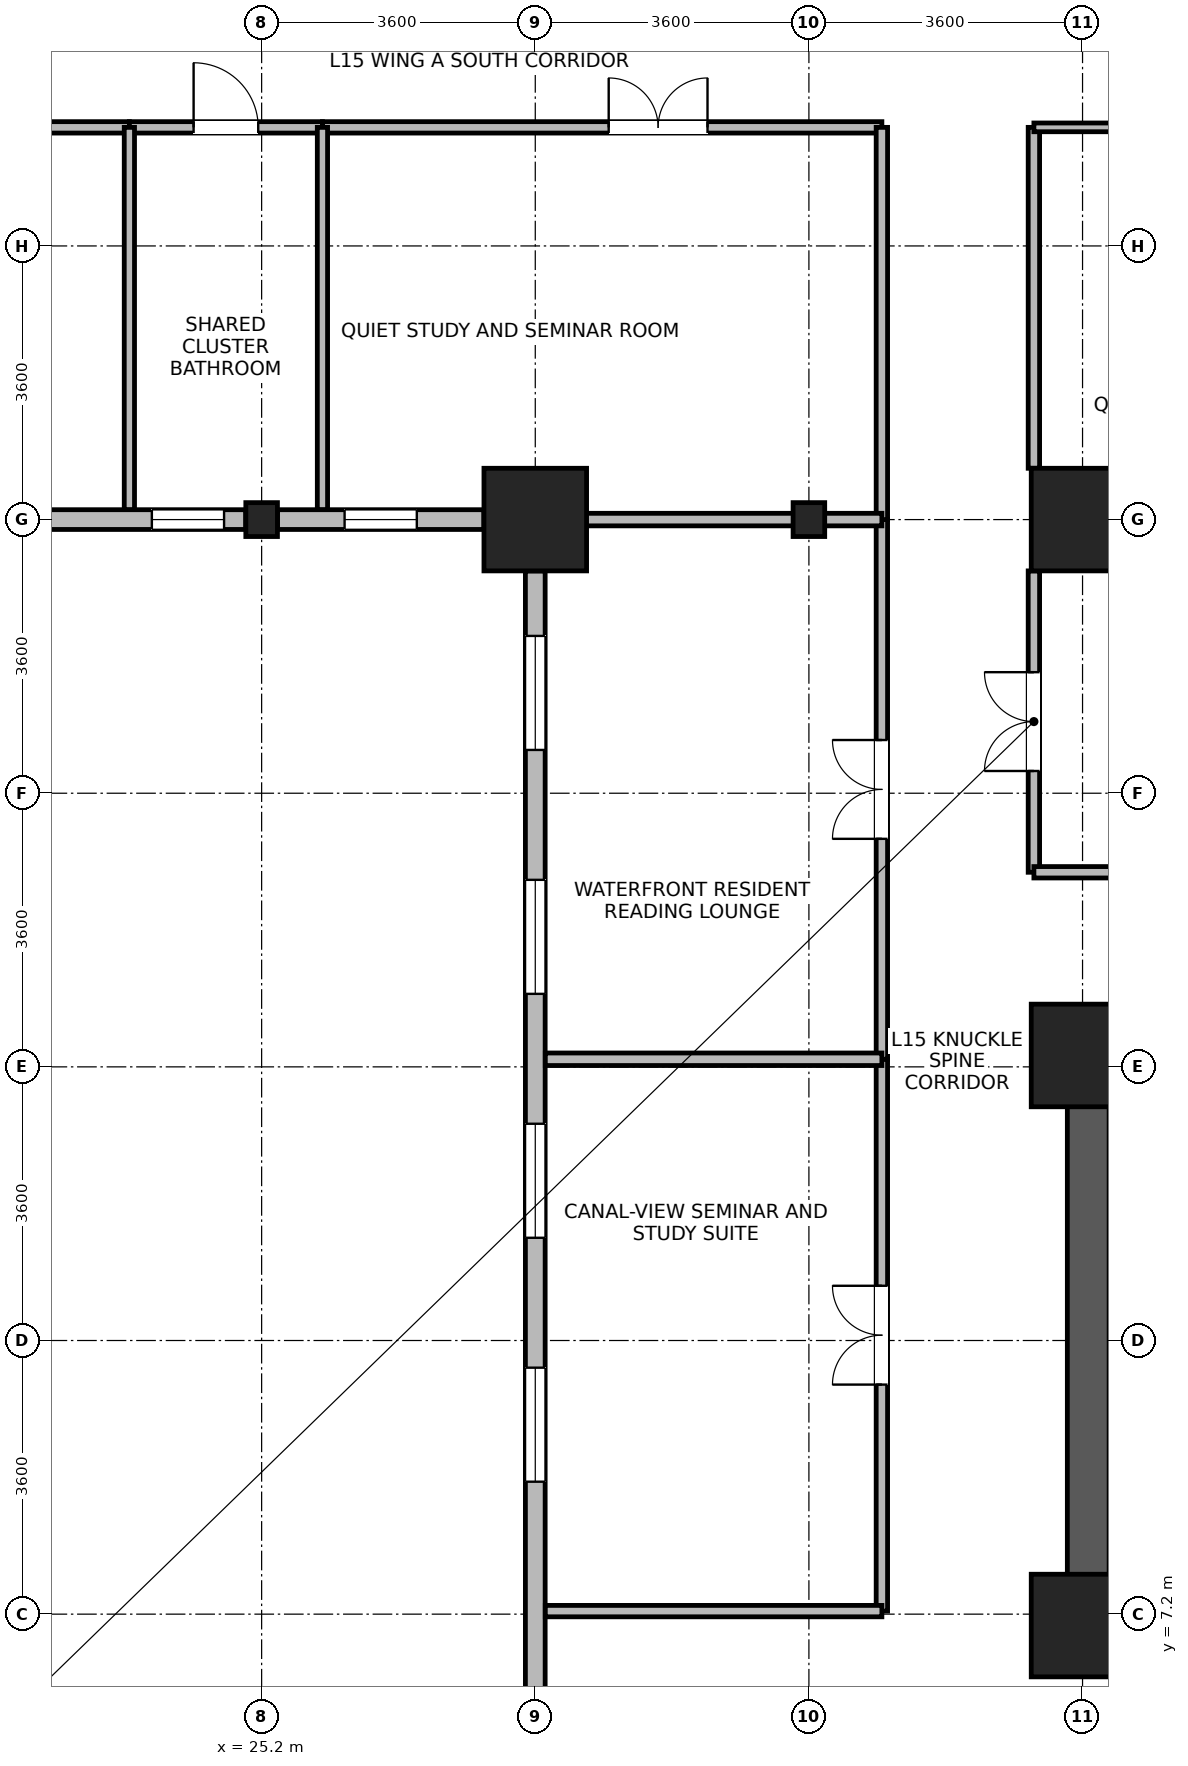
"""IFC4 building model, lengths in metres.
Left out: names, types, materials, properties, quantities, classifications, styles, units other than length and angle.
Written with IfcOpenShell. Run it as: python <this file> out.ifc"""

import sys

from ifc_helpers import new_model, si_unit, direction, frame, frame_2d, origin, origin_2d, place, context, subcontext, project, spatial, rectangle, i_section, extrude, source, transform, mapped, element, fill, save


model = new_model("IFC4")
c1 = context("Model", 3, precision=1e-05, world=origin(), true_north=direction((0.0, 1.0)))
c2 = subcontext(c1, "Body", "Model", "MODEL_VIEW")
j1 = project(units=[si_unit("LENGTHUNIT", "METRE"), si_unit("PLANEANGLEUNIT", "RADIAN")], contexts=[c1])
p1 = place(None, origin())
s1 = spatial("IfcSite", under=j1, at=p1, CompositionType="ELEMENT")
p2 = place(p1, origin())
s2 = spatial("IfcBuilding", under=s1, at=p2, CompositionType="ELEMENT")
p3 = place(p2, frame((0.0, 0.0, 62.3)))
s3 = spatial("IfcBuildingStorey", under=s2, at=p3, CompositionType="ELEMENT", Elevation=62.3)
p4 = place(p3, frame((36.075, 6.75, 0.0), z_axis=(0.0, 0.0, 1.0), x_axis=(0.0, 1.0, 0.0)))
e1 = element("IfcWall", 1, at=p4, inside=s3, PredefinedType="SHEAR", context=c2, shape_type="SweptSolid", body=[
    extrude(rectangle(XDim=8.1, YDim=0.55, at=frame_2d((4.05, 0.0))), origin(), (0.0, 0.0, 1.0), 3.45),
])
m1 = source(origin(), c2, "Body", "SweptSolid", [
    extrude(rectangle(XDim=1.35, YDim=1.35, at=origin_2d()), origin(), (0.0, 0.0, 1.0), 3.7),
])
for number, where, z_axis, x_axis in (
    (2, (28.8, 21.6, 0.0), (0.0, 0.0, 1.0), (1.0, 0.0, 0.0)),
    (3, (36.0, 21.6, 0.0), (0.0, 0.0, 1.0), (1.0, 0.0, 0.0)),
    (4, (36.0, 7.05, 0.0), (0.0, 0.0, 1.0), (1.0, 0.0, 0.0)),
    (5, (36.0, 14.55, 0.0), (0.0, 0.0, 1.0), (1.0, 0.0, 0.0)),
):
    element("IfcColumn", number, at=place(p3, frame(where, z_axis=z_axis, x_axis=x_axis)), inside=s3, PredefinedType="COLUMN", context=c2, shape_type="MappedRepresentation", body=[
        mapped(m1, transform((0.0, 0.0, 0.0), x_axis=(1.0, 0.0, 0.0), y_axis=(0.0, 1.0, 0.0), z_axis=(0.0, 0.0, 1.0), scale=1.0)),
    ])
m2 = source(origin(), c2, "Body", "SweptSolid", [
    extrude(i_section(OverallWidth=0.416, OverallDepth=0.446, WebThickness=0.029, FlangeThickness=0.04, FilletRadius=0.015, at=origin_2d()), origin(), (0.0, 0.0, 1.0), 3.7),
])
for number, where, z_axis, x_axis in (
    (6, (25.2, 21.6, 0.0), (0.0, 0.0, 1.0), (1.0, 0.0, 0.0)),
    (7, (32.4, 21.6, 0.0), (0.0, 0.0, 1.0), (1.0, 0.0, 0.0)),
):
    element("IfcColumn", number, at=place(p3, frame(where, z_axis=z_axis, x_axis=x_axis)), inside=s3, PredefinedType="COLUMN", context=c2, shape_type="MappedRepresentation", body=[
        mapped(m2, transform((0.0, 0.0, 0.0), x_axis=(1.0, 0.0, 0.0), y_axis=(0.0, 1.0, 0.0), z_axis=(0.0, 0.0, 1.0), scale=1.0)),
    ])
p5 = place(p3, frame((24.991, 21.6, 0.0), z_axis=(0.0, 0.0, 1.0), x_axis=(-1.0, 0.0, 0.0)))
e8 = element("IfcWall", 8, at=p5, inside=s3, PredefinedType="STANDARD", context=c2, shape_type="SweptSolid", body=[
    extrude(rectangle(XDim=2.715, YDim=0.26, at=frame_2d((1.357, 0.0))), origin(), (0.0, 0.0, 1.0), 2.93),
])
p6 = place(p5, frame((0.285, 0.0, 0.85)))
e9 = element("IfcOpeningElement", 9, at=p6, cuts=e8, PredefinedType="OPENING", context=c2, shape_type="SweptSolid", body=[
    extrude(rectangle(XDim=0.95, YDim=1.75, at=frame_2d((0.475, 0.875))), frame((0.0, 0.14, 0.0), z_axis=(0.0, -1.0, 0.0), x_axis=(1.0, 0.0, 0.0)), (0.0, 0.0, 1.0), 0.28),
])
p7 = place(p3, frame((28.124, 21.6, 0.0), z_axis=(0.0, 0.0, 1.0), x_axis=(-1.0, 0.0, 0.0)))
e10 = element("IfcWall", 10, at=p7, inside=s3, PredefinedType="STANDARD", context=c2, shape_type="SweptSolid", body=[
    extrude(rectangle(XDim=2.715, YDim=0.26, at=frame_2d((1.357, 0.0))), origin(), (0.0, 0.0, 1.0), 2.93),
])
p8 = place(p7, frame((0.883, 0.0, 0.85)))
e11 = element("IfcOpeningElement", 11, at=p8, cuts=e10, PredefinedType="OPENING", context=c2, shape_type="SweptSolid", body=[
    extrude(rectangle(XDim=0.95, YDim=1.75, at=frame_2d((0.475, 0.875))), frame((0.0, 0.14, 0.0), z_axis=(0.0, -1.0, 0.0), x_axis=(1.0, 0.0, 0.0)), (0.0, 0.0, 1.0), 0.28),
])
p9 = place(p3, frame((28.8, 1.67, 0.0), z_axis=(0.0, 0.0, 1.0), x_axis=(0.0, 1.0, 0.0)))
e12 = element("IfcWall", 12, at=p9, inside=s3, PredefinedType="STANDARD", context=c2, shape_type="SweptSolid", body=[
    extrude(rectangle(XDim=19.254, YDim=0.26, at=frame_2d((9.627, 0.0))), origin(), (0.0, 0.0, 1.0), 3.43),
])
p10 = place(p9, frame((0.854, 0.0, 0.85)))
e13 = element("IfcOpeningElement", 13, at=p10, cuts=e12, PredefinedType="OPENING", context=c2, shape_type="SweptSolid", body=[
    extrude(rectangle(XDim=1.5, YDim=1.85, at=frame_2d((0.75, 0.925))), frame((0.0, 0.14, 0.0), z_axis=(0.0, -1.0, 0.0), x_axis=(1.0, 0.0, 0.0)), (0.0, 0.0, 1.0), 0.28),
])
p11 = place(p9, frame((7.272, 0.0, 0.85)))
e14 = element("IfcOpeningElement", 14, at=p11, cuts=e12, PredefinedType="OPENING", context=c2, shape_type="SweptSolid", body=[
    extrude(rectangle(XDim=1.5, YDim=1.85, at=frame_2d((0.75, 0.925))), frame((0.0, 0.14, 0.0), z_axis=(0.0, -1.0, 0.0), x_axis=(1.0, 0.0, 0.0)), (0.0, 0.0, 1.0), 0.28),
])
p12 = place(p9, frame((10.481, 0.0, 0.85)))
e15 = element("IfcOpeningElement", 15, at=p12, cuts=e12, PredefinedType="OPENING", context=c2, shape_type="SweptSolid", body=[
    extrude(rectangle(XDim=1.5, YDim=1.85, at=frame_2d((0.75, 0.925))), frame((0.0, 0.14, 0.0), z_axis=(0.0, -1.0, 0.0), x_axis=(1.0, 0.0, 0.0)), (0.0, 0.0, 1.0), 0.28),
])
p13 = place(p9, frame((13.69, 0.0, 0.85)))
e16 = element("IfcOpeningElement", 16, at=p13, cuts=e12, PredefinedType="OPENING", context=c2, shape_type="SweptSolid", body=[
    extrude(rectangle(XDim=1.5, YDim=1.85, at=frame_2d((0.75, 0.925))), frame((0.0, 0.14, 0.0), z_axis=(0.0, -1.0, 0.0), x_axis=(1.0, 0.0, 0.0)), (0.0, 0.0, 1.0), 0.28),
])
p14 = place(p9, frame((16.899, 0.0, 0.85)))
e17 = element("IfcOpeningElement", 17, at=p14, cuts=e12, PredefinedType="OPENING", context=c2, shape_type="SweptSolid", body=[
    extrude(rectangle(XDim=1.5, YDim=1.85, at=frame_2d((0.75, 0.925))), frame((0.0, 0.14, 0.0), z_axis=(0.0, -1.0, 0.0), x_axis=(1.0, 0.0, 0.0)), (0.0, 0.0, 1.0), 0.28),
])
p15 = place(p3, frame((35.36, 16.96, 0.0), z_axis=(0.0, 0.0, 1.0), x_axis=(0.0, 1.0, 0.0)))
e18 = element("IfcWall", 18, at=p15, inside=s3, PredefinedType="PARTITIONING", context=c2, shape_type="SweptSolid", body=[
    extrude(rectangle(XDim=3.965, YDim=0.15, at=frame_2d((1.982, 0.0))), origin(), (0.0, 0.0, 1.0), 3.43),
])
p16 = place(p15, frame((1.333, 0.0, 0.0)))
e19 = element("IfcOpeningElement", 19, at=p16, cuts=e18, PredefinedType="OPENING", context=c2, shape_type="SweptSolid", body=[
    extrude(rectangle(XDim=1.3, YDim=2.12, at=frame_2d((0.65, 1.06))), frame((0.0, 0.085, 0.0), z_axis=(0.0, -1.0, 0.0), x_axis=(1.0, 0.0, 0.0)), (0.0, 0.0, 1.0), 0.17),
])
p17 = place(p3, frame((35.36, 22.275, 0.0), z_axis=(0.0, 0.0, 1.0), x_axis=(0.0, 1.0, 0.0)))
e20 = element("IfcWall", 20, at=p17, inside=s3, PredefinedType="PARTITIONING", context=c2, shape_type="SweptSolid", body=[
    extrude(rectangle(XDim=4.485, YDim=0.15, at=frame_2d((2.243, 0.0))), origin(), (0.0, 0.0, 1.0), 3.43),
])
p18 = place(p3, frame((26.0, 26.76, 0.0), z_axis=(0.0, 0.0, 1.0), x_axis=(1.0, 0.0, 0.0)))
e21 = element("IfcWall", 21, at=p18, inside=s3, PredefinedType="PARTITIONING", context=c2, shape_type="SweptSolid", body=[
    extrude(rectangle(XDim=7.36, YDim=0.15, at=frame_2d((3.68, 0.0))), origin(), (0.0, 0.0, 1.0), 3.43),
])
p19 = place(p18, frame((3.766, 0.0, 0.0)))
e22 = element("IfcOpeningElement", 22, at=p19, cuts=e21, PredefinedType="OPENING", context=c2, shape_type="SweptSolid", body=[
    extrude(rectangle(XDim=1.3, YDim=2.12, at=frame_2d((0.65, 1.06))), frame((0.0, 0.085, 0.0), z_axis=(0.0, -1.0, 0.0), x_axis=(1.0, 0.0, 0.0)), (0.0, 0.0, 1.0), 0.17),
])
p20 = place(p3, frame((33.36, 7.24, 0.0), z_axis=(0.0, 0.0, 1.0), x_axis=(0.0, 1.0, 0.0)))
e23 = element("IfcWall", 23, at=p20, inside=s3, PredefinedType="PARTITIONING", context=c2, shape_type="SweptSolid", body=[
    extrude(rectangle(XDim=7.26, YDim=0.15, at=frame_2d((3.63, 0.0))), origin(), (0.0, 0.0, 1.0), 3.43),
])
p21 = place(p20, frame((2.98, 0.0, 0.0)))
e24 = element("IfcOpeningElement", 24, at=p21, cuts=e23, PredefinedType="OPENING", context=c2, shape_type="SweptSolid", body=[
    extrude(rectangle(XDim=1.3, YDim=2.12, at=frame_2d((0.65, 1.06))), frame((0.0, 0.085, 0.0), z_axis=(0.0, -1.0, 0.0), x_axis=(1.0, 0.0, 0.0)), (0.0, 0.0, 1.0), 0.17),
])
p22 = place(p3, frame((33.36, 14.5, 0.0), z_axis=(0.0, 0.0, 1.0), x_axis=(0.0, 1.0, 0.0)))
e25 = element("IfcWall", 25, at=p22, inside=s3, PredefinedType="PARTITIONING", context=c2, shape_type="SweptSolid", body=[
    extrude(rectangle(XDim=7.1, YDim=0.15, at=frame_2d((3.55, 0.0))), origin(), (0.0, 0.0, 1.0), 3.43),
])
p23 = place(p22, frame((2.9, 0.0, 0.0)))
e26 = element("IfcOpeningElement", 26, at=p23, cuts=e25, PredefinedType="OPENING", context=c2, shape_type="SweptSolid", body=[
    extrude(rectangle(XDim=1.3, YDim=2.12, at=frame_2d((0.65, 1.06))), frame((0.0, 0.085, 0.0), z_axis=(0.0, -1.0, 0.0), x_axis=(1.0, 0.0, 0.0)), (0.0, 0.0, 1.0), 0.17),
])
p24 = place(p3, frame((35.36, 16.96, 0.0), z_axis=(0.0, 0.0, 1.0), x_axis=(1.0, 0.0, 0.0)))
e27 = element("IfcWall", 27, at=p24, inside=s3, PredefinedType="PARTITIONING", context=c2, shape_type="SweptSolid", body=[
    extrude(rectangle(XDim=6.04, YDim=0.15, at=frame_2d((3.02, 0.0))), origin(), (0.0, 0.0, 1.0), 3.43),
])
p25 = place(p3, frame((17.46, 26.76, 0.0), z_axis=(0.0, 0.0, 1.0), x_axis=(1.0, 0.0, 0.0)))
e28 = element("IfcWall", 28, at=p25, inside=s3, PredefinedType="PARTITIONING", context=c2, shape_type="SweptSolid", body=[
    extrude(rectangle(XDim=6.0, YDim=0.15, at=frame_2d((3.0, 0.0))), origin(), (0.0, 0.0, 1.0), 3.43),
])
p26 = place(p25, frame((2.525, 0.0, 0.0)))
e29 = element("IfcOpeningElement", 29, at=p26, cuts=e28, PredefinedType="OPENING", context=c2, shape_type="SweptSolid", body=[
    extrude(rectangle(XDim=0.95, YDim=2.1, at=frame_2d((0.475, 1.05))), frame((0.0, 0.085, 0.0), z_axis=(0.0, -1.0, 0.0), x_axis=(1.0, 0.0, 0.0)), (0.0, 0.0, 1.0), 0.17),
])
p27 = place(p3, frame((33.36, 21.6, 0.0), z_axis=(0.0, 0.0, 1.0), x_axis=(0.0, 1.0, 0.0)))
e30 = element("IfcWall", 30, at=p27, inside=s3, PredefinedType="PARTITIONING", context=c2, shape_type="SweptSolid", body=[
    extrude(rectangle(XDim=5.16, YDim=0.15, at=frame_2d((2.58, 0.0))), origin(), (0.0, 0.0, 1.0), 3.43),
])
p28 = place(p3, frame((28.932, 7.24, 0.0), z_axis=(0.0, 0.0, 1.0), x_axis=(1.0, 0.0, 0.0)))
e31 = element("IfcWall", 31, at=p28, inside=s3, PredefinedType="PARTITIONING", context=c2, shape_type="SweptSolid", body=[
    extrude(rectangle(XDim=4.428, YDim=0.15, at=frame_2d((2.214, 0.0))), origin(), (0.0, 0.0, 1.0), 3.43),
])
p29 = place(p3, frame((23.46, 26.76, 0.0), z_axis=(0.0, 0.0, 1.0), x_axis=(1.0, 0.0, 0.0)))
e32 = element("IfcWall", 32, at=p29, inside=s3, PredefinedType="PARTITIONING", context=c2, shape_type="SweptSolid", body=[
    extrude(rectangle(XDim=2.54, YDim=0.15, at=frame_2d((1.27, 0.0))), origin(), (0.0, 0.0, 1.0), 3.43),
])
p30 = place(p29, frame((0.845, 0.0, 0.0)))
e33 = element("IfcOpeningElement", 33, at=p30, cuts=e32, PredefinedType="OPENING", context=c2, shape_type="SweptSolid", body=[
    extrude(rectangle(XDim=0.85, YDim=2.04, at=frame_2d((0.425, 1.02))), frame((0.0, 0.085, 0.0), z_axis=(0.0, -1.0, 0.0), x_axis=(1.0, 0.0, 0.0)), (0.0, 0.0, 1.0), 0.17),
])
p31 = place(p3, frame((35.36, 26.76, 0.0), z_axis=(0.0, 0.0, 1.0), x_axis=(1.0, 0.0, 0.0)))
e34 = element("IfcWall", 34, at=p31, inside=s3, PredefinedType="PARTITIONING", context=c2, shape_type="SweptSolid", body=[
    extrude(rectangle(XDim=6.04, YDim=0.115, at=frame_2d((3.02, 0.0))), origin(), (0.0, 0.0, 1.0), 3.43),
])
for number, where, z_axis, x_axis in (
    (35, (23.46, 21.732, 0.0), (0.0, 0.0, 1.0), (0.0, 1.0, 0.0)),
    (36, (26.0, 21.732, 0.0), (0.0, 0.0, 1.0), (0.0, 1.0, 0.0)),
):
    element("IfcWall", number, at=place(p3, frame(where, z_axis=z_axis, x_axis=x_axis)), inside=s3, PredefinedType="PARTITIONING", context=c2, shape_type="SweptSolid", body=[
        extrude(rectangle(XDim=5.028, YDim=0.135, at=frame_2d((2.514, 0.0))), origin(), (0.0, 0.0, 1.0), 3.43),
    ])
p32 = place(p3, frame((28.932, 14.5, 0.0), z_axis=(0.0, 0.0, 1.0), x_axis=(1.0, 0.0, 0.0)))
e37 = element("IfcWall", 37, at=p32, inside=s3, PredefinedType="PARTITIONING", context=c2, shape_type="SweptSolid", body=[
    extrude(rectangle(XDim=4.428, YDim=0.165, at=frame_2d((2.214, 0.0))), origin(), (0.0, 0.0, 1.0), 3.43),
])
p33 = place(p3, frame((28.932, 21.6, 0.0), z_axis=(0.0, 0.0, 1.0), x_axis=(1.0, 0.0, 0.0)))
e38 = element("IfcWall", 38, at=p33, inside=s3, PredefinedType="PARTITIONING", context=c2, shape_type="SweptSolid", body=[
    extrude(rectangle(XDim=4.428, YDim=0.165, at=frame_2d((2.214, 0.0))), origin(), (0.0, 0.0, 1.0), 2.93),
])
p34 = place(p6, origin())
e39 = element("IfcWindow", 39, at=p34, inside=s3, PartitioningType="SINGLE_PANEL", PredefinedType="WINDOW", context=c2, shape_type="SweptSolid", body=[
    extrude(rectangle(XDim=0.95, YDim=1.75, at=frame_2d((0.475, 0.875))), frame((0.0, 0.03, 0.0), z_axis=(0.0, -1.0, 0.0), x_axis=(1.0, 0.0, 0.0)), (0.0, 0.0, 1.0), 0.06),
])
fill(e9, e39)
p35 = place(p8, origin())
e40 = element("IfcWindow", 40, at=p35, inside=s3, PartitioningType="SINGLE_PANEL", PredefinedType="WINDOW", context=c2, shape_type="SweptSolid", body=[
    extrude(rectangle(XDim=0.95, YDim=1.75, at=frame_2d((0.475, 0.875))), frame((0.0, 0.03, 0.0), z_axis=(0.0, -1.0, 0.0), x_axis=(1.0, 0.0, 0.0)), (0.0, 0.0, 1.0), 0.06),
])
fill(e11, e40)
p36 = place(p11, origin())
e41 = element("IfcWindow", 41, at=p36, inside=s3, PartitioningType="SINGLE_PANEL", PredefinedType="WINDOW", context=c2, shape_type="SweptSolid", body=[
    extrude(rectangle(XDim=1.5, YDim=1.85, at=frame_2d((0.75, 0.925))), frame((0.0, 0.03, 0.0), z_axis=(0.0, -1.0, 0.0), x_axis=(1.0, 0.0, 0.0)), (0.0, 0.0, 1.0), 0.06),
])
fill(e14, e41)
p37 = place(p12, origin())
e42 = element("IfcWindow", 42, at=p37, inside=s3, PartitioningType="SINGLE_PANEL", PredefinedType="WINDOW", context=c2, shape_type="SweptSolid", body=[
    extrude(rectangle(XDim=1.5, YDim=1.85, at=frame_2d((0.75, 0.925))), frame((0.0, 0.03, 0.0), z_axis=(0.0, -1.0, 0.0), x_axis=(1.0, 0.0, 0.0)), (0.0, 0.0, 1.0), 0.06),
])
fill(e15, e42)
p38 = place(p13, origin())
e43 = element("IfcWindow", 43, at=p38, inside=s3, PartitioningType="SINGLE_PANEL", PredefinedType="WINDOW", context=c2, shape_type="SweptSolid", body=[
    extrude(rectangle(XDim=1.5, YDim=1.85, at=frame_2d((0.75, 0.925))), frame((0.0, 0.03, 0.0), z_axis=(0.0, -1.0, 0.0), x_axis=(1.0, 0.0, 0.0)), (0.0, 0.0, 1.0), 0.06),
])
fill(e16, e43)
p39 = place(p14, origin())
e44 = element("IfcWindow", 44, at=p39, inside=s3, PartitioningType="SINGLE_PANEL", PredefinedType="WINDOW", context=c2, shape_type="SweptSolid", body=[
    extrude(rectangle(XDim=1.5, YDim=1.85, at=frame_2d((0.75, 0.925))), frame((0.0, 0.03, 0.0), z_axis=(0.0, -1.0, 0.0), x_axis=(1.0, 0.0, 0.0)), (0.0, 0.0, 1.0), 0.06),
])
fill(e17, e44)
p40 = place(p16, origin())
e45 = element("IfcDoor", 45, at=p40, inside=s3, OperationType="DOUBLE_DOOR_SINGLE_SWING", PredefinedType="DOOR", context=c2, shape_type="SweptSolid", body=[
    extrude(rectangle(XDim=1.3, YDim=2.12, at=frame_2d((0.65, 1.06))), frame((0.0, 0.025, 0.0), z_axis=(0.0, -1.0, 0.0), x_axis=(1.0, 0.0, 0.0)), (0.0, 0.0, 1.0), 0.05),
])
fill(e19, e45)
p41 = place(p19, origin())
e46 = element("IfcDoor", 46, at=p41, inside=s3, OperationType="DOUBLE_DOOR_SINGLE_SWING", PredefinedType="DOOR", context=c2, shape_type="SweptSolid", body=[
    extrude(rectangle(XDim=1.3, YDim=2.12, at=frame_2d((0.65, 1.06))), frame((0.0, 0.025, 0.0), z_axis=(0.0, -1.0, 0.0), x_axis=(1.0, 0.0, 0.0)), (0.0, 0.0, 1.0), 0.05),
])
fill(e22, e46)
p42 = place(p21, origin())
e47 = element("IfcDoor", 47, at=p42, inside=s3, OperationType="DOUBLE_DOOR_SINGLE_SWING", PredefinedType="DOOR", context=c2, shape_type="SweptSolid", body=[
    extrude(rectangle(XDim=1.3, YDim=2.12, at=frame_2d((0.65, 1.06))), frame((0.0, 0.025, 0.0), z_axis=(0.0, -1.0, 0.0), x_axis=(1.0, 0.0, 0.0)), (0.0, 0.0, 1.0), 0.05),
])
fill(e24, e47)
p43 = place(p23, origin())
e48 = element("IfcDoor", 48, at=p43, inside=s3, OperationType="DOUBLE_DOOR_SINGLE_SWING", PredefinedType="DOOR", context=c2, shape_type="SweptSolid", body=[
    extrude(rectangle(XDim=1.3, YDim=2.12, at=frame_2d((0.65, 1.06))), frame((0.0, 0.025, 0.0), z_axis=(0.0, -1.0, 0.0), x_axis=(1.0, 0.0, 0.0)), (0.0, 0.0, 1.0), 0.05),
])
fill(e26, e48)
p44 = place(p30, origin())
e49 = element("IfcDoor", 49, at=p44, inside=s3, OperationType="SINGLE_SWING_LEFT", PredefinedType="DOOR", context=c2, shape_type="SweptSolid", body=[
    extrude(rectangle(XDim=0.85, YDim=2.04, at=frame_2d((0.425, 1.02))), frame((0.0, 0.025, 0.0), z_axis=(0.0, -1.0, 0.0), x_axis=(1.0, 0.0, 0.0)), (0.0, 0.0, 1.0), 0.05),
])
fill(e33, e49)
save(model, sys.argv[1])
